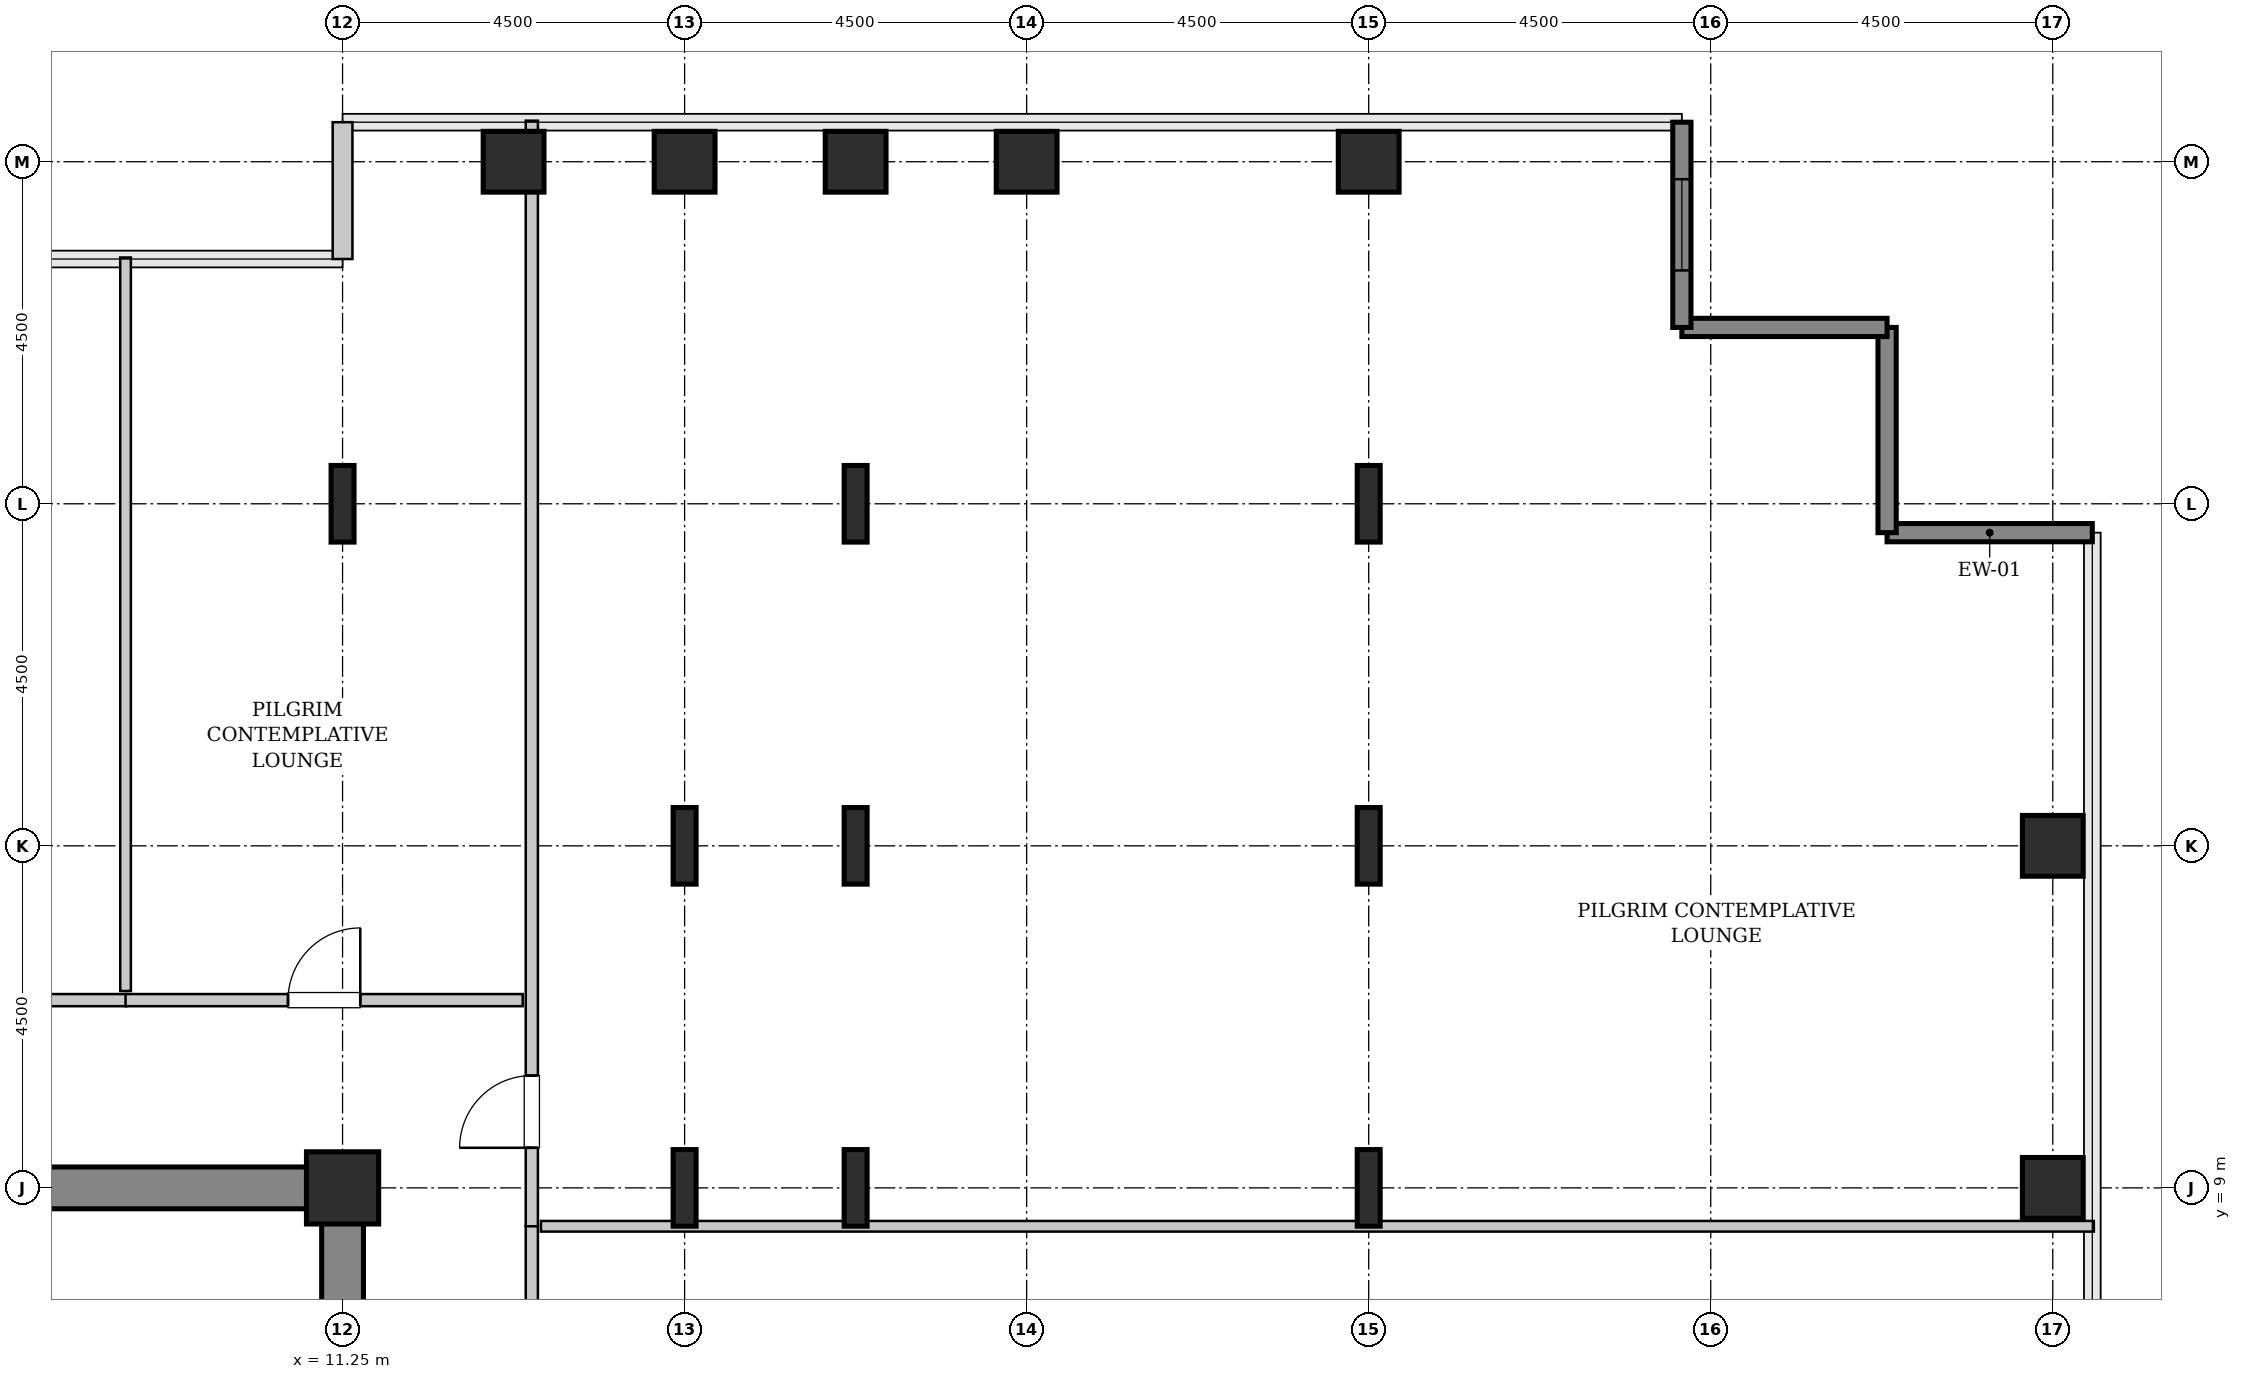
"""IFC4 building model, lengths in metres.
Left out: names, types, materials, properties, quantities, classifications, styles, units other than length and angle.
Written with IfcOpenShell. Run it as: python <this file> out.ifc"""

import sys

from ifc_helpers import new_model, si_unit, direction, frame, frame_2d, origin, origin_2d, place, context, subcontext, project, spatial, rectangle, hollow_rectangle, i_section, extrude, source, transform, mapped, element, fill, save


model = new_model("IFC4")
c1 = context("Model", 3, precision=1e-05, world=origin(), true_north=direction((0.0, 1.0)))
c2 = subcontext(c1, "Body", "Model", "MODEL_VIEW")
j1 = project(units=[si_unit("LENGTHUNIT", "METRE"), si_unit("PLANEANGLEUNIT", "RADIAN")], contexts=[c1])
p1 = place(None, origin())
s1 = spatial("IfcSite", under=j1, at=p1, CompositionType="ELEMENT")
p2 = place(p1, origin())
s2 = spatial("IfcBuilding", under=s1, at=p2, CompositionType="ELEMENT")
p3 = place(p2, frame((0.0, 0.0, 128.8)))
s3 = spatial("IfcBuildingStorey", under=s2, at=p3, CompositionType="ELEMENT", Elevation=128.8)
m1 = source(origin(), c2, "Body", "SweptSolid", [
    extrude(rectangle(XDim=9.975, YDim=0.55, at=frame_2d((4.987, 0.0))), origin(), (0.0, 0.0, 1.0), 3.8),
])
p4 = place(p3, frame((1.55, 9.0, 0.0), z_axis=(0.0, 0.0, 1.0), x_axis=(1.0, 0.0, 0.0)))
e1 = element("IfcWall", 1, at=p4, inside=s3, PredefinedType="SHEAR", context=c2, shape_type="MappedRepresentation", body=[
    mapped(m1, transform((0.0, 0.0, 0.0), x_axis=(1.0, 0.0, 0.0), y_axis=(0.0, 1.0, 0.0), z_axis=(0.0, 0.0, 1.0), scale=1.0)),
])
m2 = source(origin(), c2, "Body", "SweptSolid", [
    extrude(rectangle(XDim=7.375, YDim=0.55, at=frame_2d((3.688, 0.0))), origin(), (0.0, 0.0, 1.0), 3.8),
])
p5 = place(p3, frame((11.25, 1.35, 0.0), z_axis=(0.0, 0.0, 1.0), x_axis=(0.0, 1.0, 0.0)))
e2 = element("IfcWall", 2, at=p5, inside=s3, PredefinedType="SHEAR", context=c2, shape_type="MappedRepresentation", body=[
    mapped(m2, transform((0.0, 0.0, 0.0), x_axis=(1.0, 0.0, 0.0), y_axis=(0.0, 1.0, 0.0), z_axis=(0.0, 0.0, 1.0), scale=1.0)),
])
m3 = source(origin(), c2, "Body", "SweptSolid", [
    extrude(hollow_rectangle(XDim=0.95, YDim=0.95, WallThickness=0.045, InnerFilletRadius=0.045, OuterFilletRadius=0.09, at=origin_2d()), origin(), (0.0, 0.0, 1.0), 3.8),
])
p6 = place(p3, frame((11.25, 9.0, 0.0), z_axis=(0.0, 0.0, 1.0), x_axis=(1.0, 0.0, 0.0)))
e3 = element("IfcColumn", 3, at=p6, inside=s3, PredefinedType="COLUMN", context=c2, shape_type="MappedRepresentation", body=[
    mapped(m3, transform((0.0, 0.0, 0.0), x_axis=(1.0, 0.0, 0.0), y_axis=(0.0, 1.0, 0.0), z_axis=(0.0, 0.0, 1.0), scale=1.0)),
])
m4 = source(origin(), c2, "Body", "SweptSolid", [
    extrude(i_section(OverallWidth=0.302, OverallDepth=1.008, WebThickness=0.021, FlangeThickness=0.04, FilletRadius=0.03, at=origin_2d()), origin(), (0.0, 0.0, 1.0), 3.8),
])
p7 = place(p3, frame((11.25, 18.0, 0.0), z_axis=(0.0, 0.0, 1.0), x_axis=(1.0, 0.0, 0.0)))
e4 = element("IfcColumn", 4, at=p7, inside=s3, PredefinedType="COLUMN", context=c2, shape_type="MappedRepresentation", body=[
    mapped(m4, transform((0.0, 0.0, 0.0), x_axis=(1.0, 0.0, 0.0), y_axis=(0.0, 1.0, 0.0), z_axis=(0.0, 0.0, 1.0), scale=1.0)),
])
m5 = source(origin(), c2, "Body", "SweptSolid", [
    extrude(hollow_rectangle(XDim=0.8, YDim=0.8, WallThickness=0.04, InnerFilletRadius=0.04, OuterFilletRadius=0.08, at=origin_2d()), origin(), (0.0, 0.0, 1.0), 3.8),
])
p8 = place(p3, frame((13.5, 22.5, 0.0), z_axis=(0.0, 0.0, 1.0), x_axis=(1.0, 0.0, 0.0)))
e5 = element("IfcColumn", 5, at=p8, inside=s3, PredefinedType="COLUMN", context=c2, shape_type="MappedRepresentation", body=[
    mapped(m5, transform((0.0, 0.0, 0.0), x_axis=(1.0, 0.0, 0.0), y_axis=(0.0, 1.0, 0.0), z_axis=(0.0, 0.0, 1.0), scale=1.0)),
])
for number, where, z_axis, x_axis in (
    (6, (15.75, 9.0, 0.0), (0.0, 0.0, 1.0), (1.0, 0.0, 0.0)),
    (7, (15.75, 13.5, 0.0), (0.0, 0.0, 1.0), (1.0, 0.0, 0.0)),
):
    element("IfcColumn", number, at=place(p3, frame(where, z_axis=z_axis, x_axis=x_axis)), inside=s3, PredefinedType="COLUMN", context=c2, shape_type="MappedRepresentation", body=[
        mapped(m4, transform((0.0, 0.0, 0.0), x_axis=(1.0, 0.0, 0.0), y_axis=(0.0, 1.0, 0.0), z_axis=(0.0, 0.0, 1.0), scale=1.0)),
    ])
p9 = place(p3, frame((15.75, 22.5, 0.0), z_axis=(0.0, 0.0, 1.0), x_axis=(1.0, 0.0, 0.0)))
e8 = element("IfcColumn", 8, at=p9, inside=s3, PredefinedType="COLUMN", context=c2, shape_type="MappedRepresentation", body=[
    mapped(m5, transform((0.0, 0.0, 0.0), x_axis=(1.0, 0.0, 0.0), y_axis=(0.0, 1.0, 0.0), z_axis=(0.0, 0.0, 1.0), scale=1.0)),
])
for number, where, z_axis, x_axis in (
    (9, (18.0, 9.0, 0.0), (0.0, 0.0, 1.0), (1.0, 0.0, 0.0)),
    (10, (18.0, 13.5, 0.0), (0.0, 0.0, 1.0), (1.0, 0.0, 0.0)),
    (11, (18.0, 18.0, 0.0), (0.0, 0.0, 1.0), (1.0, 0.0, 0.0)),
):
    element("IfcColumn", number, at=place(p3, frame(where, z_axis=z_axis, x_axis=x_axis)), inside=s3, PredefinedType="COLUMN", context=c2, shape_type="MappedRepresentation", body=[
        mapped(m4, transform((0.0, 0.0, 0.0), x_axis=(1.0, 0.0, 0.0), y_axis=(0.0, 1.0, 0.0), z_axis=(0.0, 0.0, 1.0), scale=1.0)),
    ])
for number, where, z_axis, x_axis in (
    (12, (18.0, 22.5, 0.0), (0.0, 0.0, 1.0), (1.0, 0.0, 0.0)),
    (13, (20.25, 22.5, 0.0), (0.0, 0.0, 1.0), (1.0, 0.0, 0.0)),
):
    element("IfcColumn", number, at=place(p3, frame(where, z_axis=z_axis, x_axis=x_axis)), inside=s3, PredefinedType="COLUMN", context=c2, shape_type="MappedRepresentation", body=[
        mapped(m5, transform((0.0, 0.0, 0.0), x_axis=(1.0, 0.0, 0.0), y_axis=(0.0, 1.0, 0.0), z_axis=(0.0, 0.0, 1.0), scale=1.0)),
    ])
for number, where, z_axis, x_axis in (
    (14, (24.75, 9.0, 0.0), (0.0, 0.0, 1.0), (1.0, 0.0, 0.0)),
    (15, (24.75, 13.5, 0.0), (0.0, 0.0, 1.0), (1.0, 0.0, 0.0)),
    (16, (24.75, 18.0, 0.0), (0.0, 0.0, 1.0), (1.0, 0.0, 0.0)),
):
    element("IfcColumn", number, at=place(p3, frame(where, z_axis=z_axis, x_axis=x_axis)), inside=s3, PredefinedType="COLUMN", context=c2, shape_type="MappedRepresentation", body=[
        mapped(m4, transform((0.0, 0.0, 0.0), x_axis=(1.0, 0.0, 0.0), y_axis=(0.0, 1.0, 0.0), z_axis=(0.0, 0.0, 1.0), scale=1.0)),
    ])
for number, where, z_axis, x_axis in (
    (17, (24.75, 22.5, 0.0), (0.0, 0.0, 1.0), (1.0, 0.0, 0.0)),
    (18, (33.75, 9.0, 0.0), (0.0, 0.0, 1.0), (1.0, 0.0, 0.0)),
    (19, (33.75, 13.5, 0.0), (0.0, 0.0, 1.0), (1.0, 0.0, 0.0)),
):
    element("IfcColumn", number, at=place(p3, frame(where, z_axis=z_axis, x_axis=x_axis)), inside=s3, PredefinedType="COLUMN", context=c2, shape_type="MappedRepresentation", body=[
        mapped(m5, transform((0.0, 0.0, 0.0), x_axis=(1.0, 0.0, 0.0), y_axis=(0.0, 1.0, 0.0), z_axis=(0.0, 0.0, 1.0), scale=1.0)),
    ])
m6 = source(origin(), c2, "Body", "SweptSolid", [
    extrude(rectangle(XDim=2.7, YDim=0.24, at=frame_2d((1.35, 0.0))), origin(), (0.0, 0.0, 1.0), 3.55),
])
for number, where, z_axis, x_axis in (
    (20, (34.27, 17.62, 0.0), (0.0, 0.0, 1.0), (-1.0, 0.0, 0.0)),
    (21, (31.57, 17.62, 0.0), (0.0, 0.0, 1.0), (0.0, 1.0, 0.0)),
    (22, (31.57, 20.32, 0.0), (0.0, 0.0, 1.0), (-1.0, 0.0, 0.0)),
):
    element("IfcWall", number, at=place(p3, frame(where, z_axis=z_axis, x_axis=x_axis)), inside=s3, PredefinedType="SHEAR", context=c2, shape_type="MappedRepresentation", body=[
        mapped(m6, transform((0.0, 0.0, 0.0), x_axis=(1.0, 0.0, 0.0), y_axis=(0.0, 1.0, 0.0), z_axis=(0.0, 0.0, 1.0), scale=1.0)),
    ])
p10 = place(p3, frame((28.87, 20.32, 0.0), z_axis=(0.0, 0.0, 1.0), x_axis=(0.0, 1.0, 0.0)))
e23 = element("IfcWall", 23, at=p10, inside=s3, PredefinedType="SHEAR", context=c2, shape_type="MappedRepresentation", body=[
    mapped(m6, transform((0.0, 0.0, 0.0), x_axis=(1.0, 0.0, 0.0), y_axis=(0.0, 1.0, 0.0), z_axis=(0.0, 0.0, 1.0), scale=1.0)),
])
p11 = place(p10, frame((0.75, 0.0, 0.85)))
e24 = element("IfcOpeningElement", 24, at=p11, cuts=e23, PredefinedType="OPENING", context=c2, shape_type="SweptSolid", body=[
    extrude(rectangle(XDim=1.2, YDim=1.8, at=frame_2d((0.6, 0.9))), frame((0.0, 0.13, 0.0), z_axis=(0.0, -1.0, 0.0), x_axis=(1.0, 0.0, 0.0)), (0.0, 0.0, 1.0), 0.26),
])
m7 = source(origin(), c2, "Body", "SweptSolid", [
    extrude(rectangle(XDim=1.8, YDim=0.26, at=frame_2d((0.9, 0.0))), origin(), (0.0, 0.0, 1.0), 3.55),
])
p12 = place(p3, frame((11.25, 23.02, 0.0), z_axis=(0.0, 0.0, 1.0), x_axis=(0.0, -1.0, 0.0)))
e25 = element("IfcWall", 25, at=p12, inside=s3, PredefinedType="SOLIDWALL", context=c2, shape_type="MappedRepresentation", body=[
    mapped(m7, transform((0.0, 0.0, 0.0), x_axis=(1.0, 0.0, 0.0), y_axis=(0.0, 1.0, 0.0), z_axis=(0.0, 0.0, 1.0), scale=1.0)),
])
m8 = source(origin(), c2, "Body", "SweptSolid", [
    extrude(rectangle(XDim=3.11, YDim=0.16, at=frame_2d((1.555, 0.0))), origin(), (0.0, 0.0, 1.0), 3.535),
])
p13 = place(p3, frame((13.74, 5.395, 0.0), z_axis=(0.0, 0.0, 1.0), x_axis=(0.0, 1.0, 0.0)))
e26 = element("IfcWall", 26, at=p13, inside=s3, PredefinedType="PARTITIONING", context=c2, shape_type="MappedRepresentation", body=[
    mapped(m8, transform((0.0, 0.0, 0.0), x_axis=(1.0, 0.0, 0.0), y_axis=(0.0, 1.0, 0.0), z_axis=(0.0, 0.0, 1.0), scale=1.0)),
])
p14 = place(p13, frame((1.08, 0.0, 0.0)))
e27 = element("IfcOpeningElement", 27, at=p14, cuts=e26, PredefinedType="OPENING", context=c2, shape_type="SweptSolid", body=[
    extrude(rectangle(XDim=0.95, YDim=2.1, at=frame_2d((0.475, 1.05))), frame((0.0, 0.09, 0.0), z_axis=(0.0, -1.0, 0.0), x_axis=(1.0, 0.0, 0.0)), (0.0, 0.0, 1.0), 0.18),
])
m9 = source(origin(), c2, "Body", "SweptSolid", [
    extrude(rectangle(XDim=20.43, YDim=0.14, at=frame_2d((10.215, 0.0))), origin(), (0.0, 0.0, 1.0), 2.875),
])
p15 = place(p3, frame((13.86, 8.495, 0.0), z_axis=(0.0, 0.0, 1.0), x_axis=(1.0, 0.0, 0.0)))
e28 = element("IfcWall", 28, at=p15, inside=s3, PredefinedType="PARTITIONING", context=c2, shape_type="MappedRepresentation", body=[
    mapped(m9, transform((0.0, 0.0, 0.0), x_axis=(1.0, 0.0, 0.0), y_axis=(0.0, 1.0, 0.0), z_axis=(0.0, 0.0, 1.0), scale=1.0)),
])
m10 = source(origin(), c2, "Body", "SweptSolid", [
    extrude(rectangle(XDim=14.545, YDim=0.16, at=frame_2d((7.272, 0.0))), origin(), (0.0, 0.0, 1.0), 3.535),
])
p16 = place(p3, frame((13.74, 8.495, 0.0), z_axis=(0.0, 0.0, 1.0), x_axis=(0.0, 1.0, 0.0)))
e29 = element("IfcWall", 29, at=p16, inside=s3, PredefinedType="PARTITIONING", context=c2, shape_type="MappedRepresentation", body=[
    mapped(m10, transform((0.0, 0.0, 0.0), x_axis=(1.0, 0.0, 0.0), y_axis=(0.0, 1.0, 0.0), z_axis=(0.0, 0.0, 1.0), scale=1.0)),
])
p17 = place(p16, frame((1.032, 0.0, 0.0)))
e30 = element("IfcOpeningElement", 30, at=p17, cuts=e29, PredefinedType="OPENING", context=c2, shape_type="SweptSolid", body=[
    extrude(rectangle(XDim=0.95, YDim=2.1, at=frame_2d((0.475, 1.05))), frame((0.0, 0.09, 0.0), z_axis=(0.0, -1.0, 0.0), x_axis=(1.0, 0.0, 0.0)), (0.0, 0.0, 1.0), 0.18),
])
m11 = source(origin(), c2, "Body", "SweptSolid", [
    extrude(rectangle(XDim=6.21, YDim=0.16, at=frame_2d((3.105, 0.0))), origin(), (0.0, 0.0, 1.0), 3.535),
])
p18 = place(p3, frame((2.195, 11.47, 0.0), z_axis=(0.0, 0.0, 1.0), x_axis=(1.0, 0.0, 0.0)))
e31 = element("IfcWall", 31, at=p18, inside=s3, PredefinedType="PARTITIONING", context=c2, shape_type="MappedRepresentation", body=[
    mapped(m11, transform((0.0, 0.0, 0.0), x_axis=(1.0, 0.0, 0.0), y_axis=(0.0, 1.0, 0.0), z_axis=(0.0, 0.0, 1.0), scale=1.0)),
])
p19 = place(p18, frame((2.63, 0.0, 0.0)))
e32 = element("IfcOpeningElement", 32, at=p19, cuts=e31, PredefinedType="OPENING", context=c2, shape_type="SweptSolid", body=[
    extrude(rectangle(XDim=0.95, YDim=2.1, at=frame_2d((0.475, 1.05))), frame((0.0, 0.09, 0.0), z_axis=(0.0, -1.0, 0.0), x_axis=(1.0, 0.0, 0.0)), (0.0, 0.0, 1.0), 0.18),
])
m12 = source(origin(), c2, "Body", "SweptSolid", [
    extrude(rectangle(XDim=9.65, YDim=0.14, at=frame_2d((4.825, 0.0))), origin(), (0.0, 0.0, 1.0), 3.535),
])
p20 = place(p3, frame((8.395, 11.59, 0.0), z_axis=(0.0, 0.0, 1.0), x_axis=(0.0, 1.0, 0.0)))
e33 = element("IfcWall", 33, at=p20, inside=s3, PredefinedType="PARTITIONING", context=c2, shape_type="MappedRepresentation", body=[
    mapped(m12, transform((0.0, 0.0, 0.0), x_axis=(1.0, 0.0, 0.0), y_axis=(0.0, 1.0, 0.0), z_axis=(0.0, 0.0, 1.0), scale=1.0)),
])
m13 = source(origin(), c2, "Body", "SweptSolid", [
    extrude(rectangle(XDim=5.225, YDim=0.16, at=frame_2d((2.613, 0.0))), origin(), (0.0, 0.0, 1.0), 3.535),
])
p21 = place(p3, frame((8.395, 11.47, 0.0), z_axis=(0.0, 0.0, 1.0), x_axis=(1.0, 0.0, 0.0)))
e34 = element("IfcWall", 34, at=p21, inside=s3, PredefinedType="PARTITIONING", context=c2, shape_type="MappedRepresentation", body=[
    mapped(m13, transform((0.0, 0.0, 0.0), x_axis=(1.0, 0.0, 0.0), y_axis=(0.0, 1.0, 0.0), z_axis=(0.0, 0.0, 1.0), scale=1.0)),
])
p22 = place(p21, frame((2.137, 0.0, 0.0)))
e35 = element("IfcOpeningElement", 35, at=p22, cuts=e34, PredefinedType="OPENING", context=c2, shape_type="SweptSolid", body=[
    extrude(rectangle(XDim=0.95, YDim=2.1, at=frame_2d((0.475, 1.05))), frame((0.0, 0.09, 0.0), z_axis=(0.0, -1.0, 0.0), x_axis=(1.0, 0.0, 0.0)), (0.0, 0.0, 1.0), 0.18),
])
m14 = source(origin(), c2, "Body", "SweptSolid", [
    extrude(rectangle(XDim=1.2, YDim=1.8, at=frame_2d((0.6, 0.9))), frame((0.0, 0.03, 0.0), z_axis=(0.0, -1.0, 0.0), x_axis=(1.0, 0.0, 0.0)), (0.0, 0.0, 1.0), 0.06),
])
p23 = place(p11, origin())
e36 = element("IfcWindow", 36, at=p23, inside=s3, PartitioningType="SINGLE_PANEL", PredefinedType="WINDOW", context=c2, shape_type="MappedRepresentation", body=[
    mapped(m14, transform((0.0, 0.0, 0.0), x_axis=(1.0, 0.0, 0.0), y_axis=(0.0, 1.0, 0.0), z_axis=(0.0, 0.0, 1.0), scale=1.0)),
])
fill(e24, e36)
m15 = source(origin(), c2, "Body", "SweptSolid", [
    extrude(rectangle(XDim=0.95, YDim=2.1, at=frame_2d((0.475, 1.05))), frame((0.0, 0.025, 0.0), z_axis=(0.0, -1.0, 0.0), x_axis=(1.0, 0.0, 0.0)), (0.0, 0.0, 1.0), 0.05),
])
p24 = place(p17, origin())
e37 = element("IfcDoor", 37, at=p24, inside=s3, OperationType="SINGLE_SWING_LEFT", PredefinedType="DOOR", context=c2, shape_type="MappedRepresentation", body=[
    mapped(m15, transform((0.0, 0.0, 0.0), x_axis=(1.0, 0.0, 0.0), y_axis=(0.0, 1.0, 0.0), z_axis=(0.0, 0.0, 1.0), scale=1.0)),
])
fill(e30, e37)
p25 = place(p22, origin())
e38 = element("IfcDoor", 38, at=p25, inside=s3, OperationType="SINGLE_SWING_RIGHT", PredefinedType="DOOR", context=c2, shape_type="MappedRepresentation", body=[
    mapped(m15, transform((0.0, 0.0, 0.0), x_axis=(1.0, 0.0, 0.0), y_axis=(0.0, 1.0, 0.0), z_axis=(0.0, 0.0, 1.0), scale=1.0)),
])
fill(e35, e38)
save(model, sys.argv[1])
